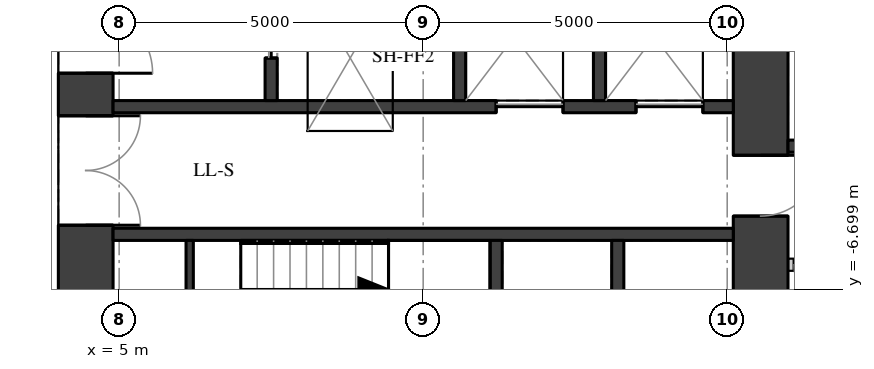
"""IFC4 building model, lengths in metres.
Left out: names, types, materials, properties, quantities, classifications, styles, units other than length and angle.
Written with IfcOpenShell. Run it as: python <this file> out.ifc"""

import sys

from ifc_helpers import new_model, si_unit, direction, frame, frame_2d, origin, place, context, subcontext, project, spatial, rectangle, extrude, element, fill, save


model = new_model("IFC4")
c1 = context("Model", 3, precision=1e-05, world=origin(), true_north=direction((0.0, 1.0)))
c2 = subcontext(c1, "Body", "Model", "MODEL_VIEW")
j1 = project(units=[si_unit("LENGTHUNIT", "METRE"), si_unit("PLANEANGLEUNIT", "RADIAN")], contexts=[c1])
p1 = place(None, origin())
s1 = spatial("IfcSite", under=j1, at=p1, CompositionType="ELEMENT")
p2 = place(p1, origin())
s2 = spatial("IfcBuilding", under=s1, at=p2, CompositionType="ELEMENT")
p3 = place(p2, frame((0.0, 0.0, 31.6)))
s3 = spatial("IfcBuildingStorey", under=s2, at=p3, CompositionType="ELEMENT", Elevation=31.6)
p4 = place(p3, frame((4.45, -11.1, 0.0), z_axis=(0.0, 0.0, 1.0), x_axis=(0.0, 1.0, 0.0)))
e1 = element("IfcWall", 1, at=p4, inside=s3, PredefinedType="SHEAR", context=c2, shape_type="SweptSolid", body=[
    extrude(rectangle(XDim=22.2, YDim=0.9, at=frame_2d((11.1, 0.0))), origin(), (0.0, 0.0, 1.0), 3.02),
])
p5 = place(p4, frame((2.35, 0.0, 0.0)))
e2 = element("IfcOpeningElement", 2, at=p5, cuts=e1, PredefinedType="OPENING", context=c2, shape_type="SweptSolid", body=[
    extrude(rectangle(XDim=1.5, YDim=2.1, at=frame_2d((0.75, 1.05))), frame((0.0, 0.46, 0.0), z_axis=(0.0, -1.0, 0.0), x_axis=(1.0, 0.0, 0.0)), (0.0, 0.0, 1.0), 0.92),
])
p6 = place(p4, frame((5.45, 0.0, 0.0)))
e3 = element("IfcOpeningElement", 3, at=p6, cuts=e1, PredefinedType="OPENING", context=c2, shape_type="SweptSolid", body=[
    extrude(rectangle(XDim=1.8, YDim=2.1, at=frame_2d((0.9, 1.05))), frame((0.0, 0.46, 0.0), z_axis=(0.0, -1.0, 0.0), x_axis=(1.0, 0.0, 0.0)), (0.0, 0.0, 1.0), 0.92),
])
p7 = place(p4, frame((7.95, 0.0, 0.0)))
e4 = element("IfcOpeningElement", 4, at=p7, cuts=e1, PredefinedType="OPENING", context=c2, shape_type="SweptSolid", body=[
    extrude(rectangle(XDim=1.1, YDim=2.1, at=frame_2d((0.55, 1.05))), frame((0.0, 0.46, 0.0), z_axis=(0.0, -1.0, 0.0), x_axis=(1.0, 0.0, 0.0)), (0.0, 0.0, 1.0), 0.92),
])
p8 = place(p4, frame((10.6, 0.0, 0.0)))
e5 = element("IfcOpeningElement", 5, at=p8, cuts=e1, PredefinedType="OPENING", context=c2, shape_type="SweptSolid", body=[
    extrude(rectangle(XDim=1.0, YDim=2.1, at=frame_2d((0.5, 1.05))), frame((0.0, 0.46, 0.0), z_axis=(0.0, -1.0, 0.0), x_axis=(1.0, 0.0, 0.0)), (0.0, 0.0, 1.0), 0.92),
])
p9 = place(p4, frame((13.15, 0.0, 0.0)))
e6 = element("IfcOpeningElement", 6, at=p9, cuts=e1, PredefinedType="OPENING", context=c2, shape_type="SweptSolid", body=[
    extrude(rectangle(XDim=1.1, YDim=2.1, at=frame_2d((0.55, 1.05))), frame((0.0, 0.46, 0.0), z_axis=(0.0, -1.0, 0.0), x_axis=(1.0, 0.0, 0.0)), (0.0, 0.0, 1.0), 0.92),
])
p10 = place(p4, frame((14.95, 0.0, 0.0)))
e7 = element("IfcOpeningElement", 7, at=p10, cuts=e1, PredefinedType="OPENING", context=c2, shape_type="SweptSolid", body=[
    extrude(rectangle(XDim=1.8, YDim=2.1, at=frame_2d((0.9, 1.05))), frame((0.0, 0.46, 0.0), z_axis=(0.0, -1.0, 0.0), x_axis=(1.0, 0.0, 0.0)), (0.0, 0.0, 1.0), 0.92),
])
p11 = place(p4, frame((18.35, 0.0, 0.0)))
e8 = element("IfcOpeningElement", 8, at=p11, cuts=e1, PredefinedType="OPENING", context=c2, shape_type="SweptSolid", body=[
    extrude(rectangle(XDim=1.5, YDim=2.1, at=frame_2d((0.75, 1.05))), frame((0.0, 0.46, 0.0), z_axis=(0.0, -1.0, 0.0), x_axis=(1.0, 0.0, 0.0)), (0.0, 0.0, 1.0), 0.92),
])
p12 = place(p3, frame((15.55, -11.1, 0.0), z_axis=(0.0, 0.0, 1.0), x_axis=(0.0, 1.0, 0.0)))
e9 = element("IfcWall", 9, at=p12, inside=s3, PredefinedType="SHEAR", context=c2, shape_type="SweptSolid", body=[
    extrude(rectangle(XDim=22.2, YDim=0.9, at=frame_2d((11.1, 0.0))), origin(), (0.0, 0.0, 1.0), 3.02),
])
p13 = place(p12, frame((15.6, 0.0, 0.0)))
e10 = element("IfcOpeningElement", 10, at=p13, cuts=e9, PredefinedType="OPENING", context=c2, shape_type="SweptSolid", body=[
    extrude(rectangle(XDim=1.0, YDim=2.1, at=frame_2d((0.5, 1.05))), frame((0.0, 0.46, 0.0), z_axis=(0.0, -1.0, 0.0), x_axis=(1.0, 0.0, 0.0)), (0.0, 0.0, 1.0), 0.92),
])
p14 = place(p12, frame((5.6, 0.0, 0.0)))
e11 = element("IfcOpeningElement", 11, at=p14, cuts=e9, PredefinedType="OPENING", context=c2, shape_type="SweptSolid", body=[
    extrude(rectangle(XDim=1.0, YDim=2.1, at=frame_2d((0.5, 1.05))), frame((0.0, 0.46, 0.0), z_axis=(0.0, -1.0, 0.0), x_axis=(1.0, 0.0, 0.0)), (0.0, 0.0, 1.0), 0.92),
])
p15 = place(p3, frame((4.9, -3.7, 0.0), z_axis=(0.0, 0.0, 1.0), x_axis=(1.0, 0.0, 0.0)))
e12 = element("IfcWall", 12, at=p15, inside=s3, PredefinedType="SHEAR", context=c2, shape_type="SweptSolid", body=[
    extrude(rectangle(XDim=10.2, YDim=0.2, at=frame_2d((5.1, 0.0))), origin(), (0.0, 0.0, 1.0), 3.02),
])
p16 = place(p15, frame((6.3, 0.0, 0.0)))
e13 = element("IfcOpeningElement", 13, at=p16, cuts=e12, PredefinedType="OPENING", context=c2, shape_type="SweptSolid", body=[
    extrude(rectangle(XDim=1.1, YDim=2.1, at=frame_2d((0.55, 1.05))), frame((0.0, 0.11, 0.0), z_axis=(0.0, -1.0, 0.0), x_axis=(1.0, 0.0, 0.0)), (0.0, 0.0, 1.0), 0.22),
])
p17 = place(p15, frame((8.6, 0.0, 0.0)))
e14 = element("IfcOpeningElement", 14, at=p17, cuts=e12, PredefinedType="OPENING", context=c2, shape_type="SweptSolid", body=[
    extrude(rectangle(XDim=1.1, YDim=2.1, at=frame_2d((0.55, 1.05))), frame((0.0, 0.11, 0.0), z_axis=(0.0, -1.0, 0.0), x_axis=(1.0, 0.0, 0.0)), (0.0, 0.0, 1.0), 0.22),
])
p18 = place(p3, frame((4.9, -5.8, 0.0), z_axis=(0.0, 0.0, 1.0), x_axis=(1.0, 0.0, 0.0)))
e15 = element("IfcWall", 15, at=p18, inside=s3, PredefinedType="SHEAR", context=c2, shape_type="SweptSolid", body=[
    extrude(rectangle(XDim=10.2, YDim=0.2, at=frame_2d((5.1, 0.0))), origin(), (0.0, 0.0, 1.0), 3.02),
])
for number, where, z_axis, x_axis in (
    (16, (11.2, -9.1, 0.0), (0.0, 0.0, 1.0), (0.0, 1.0, 0.0)),
    (17, (13.2, -9.1, 0.0), (0.0, 0.0, 1.0), (0.0, 1.0, 0.0)),
):
    element("IfcWall", number, at=place(p3, frame(where, z_axis=z_axis, x_axis=x_axis)), inside=s3, PredefinedType="SHEAR", context=c2, shape_type="SweptSolid", body=[
        extrude(rectangle(XDim=3.2, YDim=0.2, at=frame_2d((1.6, 0.0))), origin(), (0.0, 0.0, 1.0), 3.02),
    ])
p19 = place(p3, frame((7.5, -3.6, 0.0), z_axis=(0.0, 0.0, 1.0), x_axis=(0.0, 1.0, 0.0)))
e18 = element("IfcWall", 18, at=p19, inside=s3, PredefinedType="SHEAR", context=c2, shape_type="SweptSolid", body=[
    extrude(rectangle(XDim=2.5, YDim=0.2, at=frame_2d((1.25, 0.0))), origin(), (0.0, 0.0, 1.0), 3.02),
])
p20 = place(p19, frame((0.7, 0.0, 0.0)))
e19 = element("IfcOpeningElement", 19, at=p20, cuts=e18, PredefinedType="OPENING", context=c2, shape_type="SweptSolid", body=[
    extrude(rectangle(XDim=1.1, YDim=2.1, at=frame_2d((0.55, 1.05))), frame((0.0, 0.11, 0.0), z_axis=(0.0, -1.0, 0.0), x_axis=(1.0, 0.0, 0.0)), (0.0, 0.0, 1.0), 0.22),
])
for number, where, z_axis, x_axis in (
    (20, (10.6, -3.6, 0.0), (0.0, 0.0, 1.0), (0.0, 1.0, 0.0)),
    (21, (12.9, -3.6, 0.0), (0.0, 0.0, 1.0), (0.0, 1.0, 0.0)),
):
    element("IfcWall", number, at=place(p3, frame(where, z_axis=z_axis, x_axis=x_axis)), inside=s3, PredefinedType="SHEAR", context=c2, shape_type="SweptSolid", body=[
        extrude(rectangle(XDim=2.5, YDim=0.2, at=frame_2d((1.25, 0.0))), origin(), (0.0, 0.0, 1.0), 3.02),
    ])
p21 = place(p3, frame((6.16, -9.1, 0.0), z_axis=(0.0, 0.0, 1.0), x_axis=(0.0, 1.0, 0.0)))
e22 = element("IfcWall", 22, at=p21, inside=s3, PredefinedType="SHEAR", context=c2, shape_type="SweptSolid", body=[
    extrude(rectangle(XDim=3.2, YDim=0.12, at=frame_2d((1.6, 0.0))), origin(), (0.0, 0.0, 1.0), 3.02),
])
p22 = place(p21, frame((0.85, 0.0, 0.0)))
e23 = element("IfcOpeningElement", 23, at=p22, cuts=e22, PredefinedType="OPENING", context=c2, shape_type="SweptSolid", body=[
    extrude(rectangle(XDim=1.5, YDim=2.1, at=frame_2d((0.75, 1.05))), frame((0.0, 0.07, 0.0), z_axis=(0.0, -1.0, 0.0), x_axis=(1.0, 0.0, 0.0)), (0.0, 0.0, 1.0), 0.14),
])
p23 = place(p3, frame((16.0, -4.35, 0.0), z_axis=(0.0, 0.0, 1.0), x_axis=(1.0, 0.0, 0.0)))
e24 = element("IfcWall", 24, at=p23, inside=s3, PredefinedType="SHEAR", context=c2, shape_type="SweptSolid", body=[
    extrude(rectangle(XDim=2.3, YDim=0.2, at=frame_2d((1.15, 0.0))), origin(), (0.0, 0.0, 1.0), 3.02),
])
p24 = place(p3, frame((16.0, -6.3, 0.0), z_axis=(0.0, 0.0, 1.0), x_axis=(1.0, 0.0, 0.0)))
e25 = element("IfcWall", 25, at=p24, inside=s3, PredefinedType="PARTITIONING", context=c2, shape_type="SweptSolid", body=[
    extrude(rectangle(XDim=2.3, YDim=0.2, at=frame_2d((1.15, 0.0))), origin(), (0.0, 0.0, 1.0), 3.02),
])
p25 = place(p24, frame((0.1, 0.0, 0.0)))
e26 = element("IfcOpeningElement", 26, at=p25, cuts=e25, PredefinedType="OPENING", context=c2, shape_type="SweptSolid", body=[
    extrude(rectangle(XDim=0.9, YDim=2.1, at=frame_2d((0.45, 1.05))), frame((0.0, 0.11, 0.0), z_axis=(0.0, -1.0, 0.0), x_axis=(1.0, 0.0, 0.0)), (0.0, 0.0, 1.0), 0.22),
])
p26 = place(p6, origin())
e27 = element("IfcDoor", 27, at=p26, inside=s3, OperationType="DOUBLE_DOOR_SINGLE_SWING", PredefinedType="DOOR", context=c2, shape_type="SweptSolid", body=[
    extrude(rectangle(XDim=1.8, YDim=2.1, at=frame_2d((0.9, 1.05))), frame((0.0, 0.025, 0.0), z_axis=(0.0, -1.0, 0.0), x_axis=(1.0, 0.0, 0.0)), (0.0, 0.0, 1.0), 0.05),
])
fill(e3, e27)
p27 = place(p7, origin())
e28 = element("IfcDoor", 28, at=p27, inside=s3, OperationType="SINGLE_SWING_RIGHT", PredefinedType="DOOR", context=c2, shape_type="SweptSolid", body=[
    extrude(rectangle(XDim=1.1, YDim=2.1, at=frame_2d((0.55, 1.05))), frame((0.0, 0.025, 0.0), z_axis=(0.0, -1.0, 0.0), x_axis=(1.0, 0.0, 0.0)), (0.0, 0.0, 1.0), 0.05),
])
fill(e4, e28)
p28 = place(p16, origin())
e29 = element("IfcDoor", 29, at=p28, inside=s3, OperationType="DOUBLE_DOOR_SLIDING", PredefinedType="DOOR", context=c2, shape_type="SweptSolid", body=[
    extrude(rectangle(XDim=1.1, YDim=2.1, at=frame_2d((0.55, 1.05))), frame((0.0, 0.025, 0.0), z_axis=(0.0, -1.0, 0.0), x_axis=(1.0, 0.0, 0.0)), (0.0, 0.0, 1.0), 0.05),
])
fill(e13, e29)
p29 = place(p17, origin())
e30 = element("IfcDoor", 30, at=p29, inside=s3, OperationType="DOUBLE_DOOR_SLIDING", PredefinedType="DOOR", context=c2, shape_type="SweptSolid", body=[
    extrude(rectangle(XDim=1.1, YDim=2.1, at=frame_2d((0.55, 1.05))), frame((0.0, 0.025, 0.0), z_axis=(0.0, -1.0, 0.0), x_axis=(1.0, 0.0, 0.0)), (0.0, 0.0, 1.0), 0.05),
])
fill(e14, e30)
p30 = place(p20, origin())
e31 = element("IfcDoor", 31, at=p30, inside=s3, OperationType="DOUBLE_DOOR_SLIDING", PredefinedType="DOOR", context=c2, shape_type="SweptSolid", body=[
    extrude(rectangle(XDim=1.1, YDim=2.1, at=frame_2d((0.55, 1.05))), frame((0.0, 0.025, 0.0), z_axis=(0.0, -1.0, 0.0), x_axis=(1.0, 0.0, 0.0)), (0.0, 0.0, 1.0), 0.05),
])
fill(e19, e31)
p31 = place(p14, origin())
e32 = element("IfcDoor", 32, at=p31, inside=s3, OperationType="SINGLE_SWING_LEFT", PredefinedType="DOOR", context=c2, shape_type="SweptSolid", body=[
    extrude(rectangle(XDim=1.0, YDim=2.1, at=frame_2d((0.5, 1.05))), frame((0.0, 0.025, 0.0), z_axis=(0.0, -1.0, 0.0), x_axis=(1.0, 0.0, 0.0)), (0.0, 0.0, 1.0), 0.05),
])
fill(e11, e32)
save(model, sys.argv[1])
